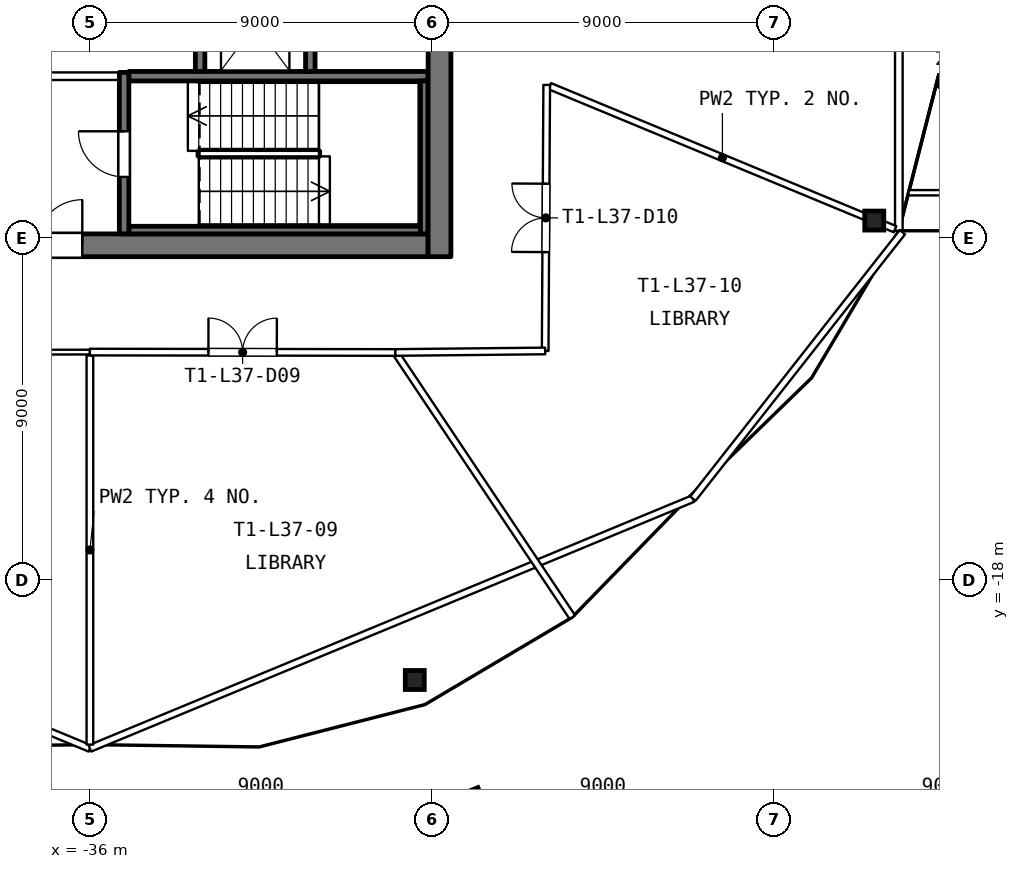
"""IFC4 building model, lengths in metres.
Left out: names, types, materials, properties, quantities, classifications, styles, units other than length and angle.
Written with IfcOpenShell. Run it as: python <this file> out.ifc"""

import sys

from ifc_helpers import new_model, si_unit, direction, frame, frame_2d, origin, origin_2d, place, context, subcontext, project, spatial, rectangle, hollow_rectangle, extrude, element, fill, save


model = new_model("IFC4")
c1 = context("Model", 3, precision=1e-05, world=origin(), true_north=direction((0.0, 1.0)))
c2 = subcontext(c1, "Body", "Model", "MODEL_VIEW")
j1 = project(units=[si_unit("LENGTHUNIT", "METRE"), si_unit("PLANEANGLEUNIT", "RADIAN")], contexts=[c1])
p1 = place(None, origin())
s1 = spatial("IfcSite", under=j1, at=p1, CompositionType="ELEMENT")
p2 = place(p1, origin())
s2 = spatial("IfcBuilding", under=s1, at=p2, CompositionType="ELEMENT")
p3 = place(p2, frame((0.0, 0.0, 130.8)))
s3 = spatial("IfcBuildingStorey", under=s2, at=p3, CompositionType="ELEMENT", Elevation=130.8)
p4 = place(p3, frame((-25.821, -24.575, 0.0), z_axis=(-0.007786476489, 0.018778670571, 0.999793344805), x_axis=(-0.707293788145, 0.706670185601, -0.018781534372)))
e1 = element("IfcColumn", 1, at=p4, inside=s3, PredefinedType="COLUMN", context=c2, shape_type="SweptSolid", body=[
    extrude(hollow_rectangle(XDim=0.9, YDim=0.9, WallThickness=0.08, at=origin_2d()), origin(), (0.0, 0.0, 1.0), 30.006),
])
p5 = place(p2, frame((0.0, 0.0, 156.8)))
s4 = spatial("IfcBuildingStorey", under=s2, at=p5, CompositionType="ELEMENT", Elevation=156.8)
for number, where, z_axis, x_axis in (
    (2, (-27.451, -20.639, 0.0), (0.0, 0.0, 1.0), (1.0, 0.0, 0.0)),
    (3, (-15.361, -8.549, 0.0), (0.0, 0.0, 1.0), (1.0, 0.0, 0.0)),
):
    element("IfcColumn", number, at=place(p5, frame(where, z_axis=z_axis, x_axis=x_axis)), inside=s4, PredefinedType="COLUMN", context=c2, shape_type="SweptSolid", body=[
        extrude(hollow_rectangle(XDim=0.5, YDim=0.5, WallThickness=0.03, at=origin_2d()), origin(), (0.0, 0.0, 1.0), 3.9),
    ])
p6 = place(p5, frame((-44.9, -9.2, 0.0), z_axis=(0.0, 0.0, 1.0), x_axis=(1.0, 0.0, 0.0)))
e4 = element("IfcWall", 4, at=p6, inside=s4, PredefinedType="SHEAR", context=c2, shape_type="SweptSolid", body=[
    extrude(rectangle(XDim=17.8, YDim=0.6, at=frame_2d((8.9, 0.0))), origin(), (0.0, 0.0, 1.0), 3.7),
])
p7 = place(p6, frame((7.5, 0.0, 0.0)))
e5 = element("IfcOpeningElement", 5, at=p7, cuts=e4, PredefinedType="OPENING", context=c2, shape_type="SweptSolid", body=[
    extrude(rectangle(XDim=1.2, YDim=2.1, at=frame_2d((0.6, 1.05))), frame((0.0, 0.31, 0.0), z_axis=(0.0, -1.0, 0.0), x_axis=(1.0, 0.0, 0.0)), (0.0, 0.0, 1.0), 0.62),
])
p8 = place(p6, frame((1.2, 0.0, 0.0)))
e6 = element("IfcOpeningElement", 6, at=p8, cuts=e4, PredefinedType="OPENING", context=c2, shape_type="SweptSolid", body=[
    extrude(rectangle(XDim=1.0, YDim=2.1, at=frame_2d((0.5, 1.05))), frame((0.0, 0.31, 0.0), z_axis=(0.0, -1.0, 0.0), x_axis=(1.0, 0.0, 0.0)), (0.0, 0.0, 1.0), 0.62),
])
p9 = place(p5, frame((-34.975, -8.8, 0.0), z_axis=(0.0, 0.0, 1.0), x_axis=(1.0, 0.0, 0.0)))
e7 = element("IfcWall", 7, at=p9, inside=s4, PredefinedType="SHEAR", context=c2, shape_type="SweptSolid", body=[
    extrude(rectangle(XDim=7.675, YDim=0.2, at=frame_2d((3.837, 0.0))), origin(), (0.0, 0.0, 1.0), 3.7),
])
p10 = place(p5, frame((-38.375, -4.75, 0.0), z_axis=(0.0, 0.0, 1.0), x_axis=(1.0, 0.0, 0.0)))
e8 = element("IfcWall", 8, at=p10, inside=s4, PredefinedType="PARTITIONING", context=c2, shape_type="SweptSolid", body=[
    extrude(rectangle(XDim=3.15, YDim=0.2, at=frame_2d((1.575, 0.0))), origin(), (0.0, 0.0, 1.0), 3.7),
])
p11 = place(p5, frame((-34.975, -4.75, 0.0), z_axis=(0.0, 0.0, 1.0), x_axis=(1.0, 0.0, 0.0)))
e9 = element("IfcWall", 9, at=p11, inside=s4, PredefinedType="SHEAR", context=c2, shape_type="SweptSolid", body=[
    extrude(rectangle(XDim=7.875, YDim=0.25, at=frame_2d((3.938, 0.0))), origin(), (0.0, 0.0, 1.0), 3.7),
])
p12 = place(p5, frame((-35.1, -8.9, 0.0), z_axis=(0.0, 0.0, 1.0), x_axis=(0.0, 1.0, 0.0)))
e10 = element("IfcWall", 10, at=p12, inside=s4, PredefinedType="SHEAR", context=c2, shape_type="SweptSolid", body=[
    extrude(rectangle(XDim=4.25, YDim=0.25, at=frame_2d((2.125, 0.0))), origin(), (0.0, 0.0, 1.0), 3.7),
])
p13 = place(p12, frame((1.5, 0.0, 0.0)))
e11 = element("IfcOpeningElement", 11, at=p13, cuts=e10, PredefinedType="OPENING", context=c2, shape_type="SweptSolid", body=[
    extrude(rectangle(XDim=1.2, YDim=2.1, at=frame_2d((0.6, 1.05))), frame((0.0, 0.135, 0.0), z_axis=(0.0, -1.0, 0.0), x_axis=(1.0, 0.0, 0.0)), (0.0, 0.0, 1.0), 0.27),
])
for number, where, z_axis, x_axis in (
    (12, (-33.1, -4.625, 0.0), (0.0, 0.0, 1.0), (0.0, 1.0, 0.0)),
    (13, (-30.2, -4.625, 0.0), (0.0, 0.0, 1.0), (0.0, 1.0, 0.0)),
):
    element("IfcWall", number, at=place(p5, frame(where, z_axis=z_axis, x_axis=x_axis)), inside=s4, PredefinedType="SHEAR", context=c2, shape_type="SweptSolid", body=[
        extrude(rectangle(XDim=2.675, YDim=0.25, at=frame_2d((1.337, 0.0))), origin(), (0.0, 0.0, 1.0), 3.7),
    ])
p14 = place(p5, frame((-27.2, -8.9, 0.0), z_axis=(0.0, 0.0, 1.0), x_axis=(0.0, 1.0, 0.0)))
e14 = element("IfcWall", 14, at=p14, inside=s4, PredefinedType="SHEAR", context=c2, shape_type="SweptSolid", body=[
    extrude(rectangle(XDim=4.025, YDim=0.2, at=frame_2d((2.012, 0.0))), origin(), (0.0, 0.0, 1.0), 3.7),
])
p15 = place(p5, frame((-26.8, -9.5, 0.0), z_axis=(0.0, 0.0, 1.0), x_axis=(0.0, 1.0, 0.0)))
e15 = element("IfcWall", 15, at=p15, inside=s4, PredefinedType="SHEAR", context=c2, shape_type="SweptSolid", body=[
    extrude(rectangle(XDim=19.0, YDim=0.6, at=frame_2d((9.5, 0.0))), origin(), (0.0, 0.0, 1.0), 3.7),
])
p16 = place(p15, frame((8.3, 0.0, 0.0)))
e16 = element("IfcOpeningElement", 16, at=p16, cuts=e15, PredefinedType="OPENING", context=c2, shape_type="SweptSolid", body=[
    extrude(rectangle(XDim=2.4, YDim=2.1, at=frame_2d((1.2, 1.05))), frame((0.0, 0.31, 0.0), z_axis=(0.0, -1.0, 0.0), x_axis=(1.0, 0.0, 0.0)), (0.0, 0.0, 1.0), 0.62),
])
p17 = place(p5, frame((-36.0, -22.339, 0.0), z_axis=(0.0, 0.0, 1.0), x_axis=(0.0, 1.0, 0.0)))
e17 = element("IfcWall", 17, at=p17, inside=s4, PredefinedType="PARTITIONING", context=c2, shape_type="SweptSolid", body=[
    extrude(rectangle(XDim=10.242, YDim=0.175, at=frame_2d((5.121, 0.0))), origin(), (0.0, 0.0, 1.0), 2.2),
])
p18 = place(p5, frame((-23.304, -18.986, 0.0), z_axis=(0.0, 0.0, 1.0), x_axis=(-0.555854795221, 0.831279403468, 0.0)))
e18 = element("IfcWall", 18, at=p18, inside=s4, PredefinedType="PARTITIONING", context=c2, shape_type="SweptSolid", body=[
    extrude(rectangle(XDim=8.292, YDim=0.175, at=frame_2d((4.146, 0.0))), origin(), (0.0, 0.0, 1.0), 2.2),
])
p19 = place(p5, frame((-14.814, -8.776, 0.0), z_axis=(0.0, 0.0, 1.0), x_axis=(-0.923885809309, 0.382668278482, 0.0)))
e19 = element("IfcWall", 19, at=p19, inside=s4, PredefinedType="PARTITIONING", context=c2, shape_type="SweptSolid", body=[
    extrude(rectangle(XDim=9.833, YDim=0.175, at=frame_2d((4.917, 0.0))), origin(), (0.0, 0.0, 1.0), 2.2),
])
p20 = place(p5, frame((-44.038, -12.021, 0.0), z_axis=(0.0, 0.0, 1.0), x_axis=(0.999999107004, 0.001336409935, 0.0)))
e20 = element("IfcWall", 20, at=p20, inside=s4, PredefinedType="PARTITIONING", context=c2, shape_type="SweptSolid", body=[
    extrude(rectangle(XDim=8.038, YDim=0.125, at=frame_2d((4.019, 0.0))), origin(), (0.0, 0.0, 1.0), 2.5),
])
p21 = place(p20, frame((3.119, 0.0, 0.0)))
e21 = element("IfcOpeningElement", 21, at=p21, cuts=e20, PredefinedType="OPENING", context=c2, shape_type="SweptSolid", body=[
    extrude(rectangle(XDim=1.8, YDim=2.1, at=frame_2d((0.9, 1.05))), frame((0.0, 0.073, 0.0), z_axis=(0.0, -1.0, 0.0), x_axis=(1.0, 0.0, 0.0)), (0.0, 0.0, 1.0), 0.145),
])
p22 = place(p5, frame((-36.0, -12.01, 0.0), z_axis=(0.0, 0.0, 1.0), x_axis=(0.999999107004, -0.001336409935, 0.0)))
e22 = element("IfcWall", 22, at=p22, inside=s4, PredefinedType="PARTITIONING", context=c2, shape_type="SweptSolid", body=[
    extrude(rectangle(XDim=8.038, YDim=0.175, at=frame_2d((4.019, 0.0))), origin(), (0.0, 0.0, 1.0), 2.5),
])
p23 = place(p22, frame((3.119, 0.0, 0.0)))
e23 = element("IfcOpeningElement", 23, at=p23, cuts=e22, PredefinedType="OPENING", context=c2, shape_type="SweptSolid", body=[
    extrude(rectangle(XDim=1.8, YDim=2.1, at=frame_2d((0.9, 1.05))), frame((0.0, 0.098, 0.0), z_axis=(0.0, -1.0, 0.0), x_axis=(1.0, 0.0, 0.0)), (0.0, 0.0, 1.0), 0.195),
])
p24 = place(p5, frame((-24.02, -11.98, 0.0), z_axis=(0.0, 0.0, 1.0), x_axis=(0.005788715954, 0.999983245243, 0.0)))
e24 = element("IfcWall", 24, at=p24, inside=s4, PredefinedType="PARTITIONING", context=c2, shape_type="SweptSolid", body=[
    extrude(rectangle(XDim=7.001, YDim=0.175, at=frame_2d((3.5, 0.0))), origin(), (0.0, 0.0, 1.0), 2.5),
])
p25 = place(p24, frame((2.601, 0.0, 0.0)))
e25 = element("IfcOpeningElement", 25, at=p25, cuts=e24, PredefinedType="OPENING", context=c2, shape_type="SweptSolid", body=[
    extrude(rectangle(XDim=1.8, YDim=2.1, at=frame_2d((0.9, 1.05))), frame((0.0, 0.098, 0.0), z_axis=(0.0, -1.0, 0.0), x_axis=(1.0, 0.0, 0.0)), (0.0, 0.0, 1.0), 0.195),
])
p26 = place(p5, frame((-27.962, -12.021, 0.0), z_axis=(0.0, 0.0, 1.0), x_axis=(0.999946514236, 0.010342565829, 0.0)))
e26 = element("IfcWall", 26, at=p26, inside=s4, PredefinedType="PARTITIONING", context=c2, shape_type="SweptSolid", body=[
    extrude(rectangle(XDim=3.942, YDim=0.175, at=frame_2d((1.971, 0.0))), origin(), (0.0, 0.0, 1.0), 3.7),
])
p27 = place(p5, frame((-14.714, -8.817, 0.0), z_axis=(0.0, 0.0, 1.0), x_axis=(0.0, 1.0, 0.0)))
e27 = element("IfcWall", 27, at=p27, inside=s4, PredefinedType="PARTITIONING", context=c2, shape_type="SweptSolid", body=[
    extrude(rectangle(XDim=17.634, YDim=0.2, at=frame_2d((8.817, 0.0))), origin(), (0.0, 0.0, 1.0), 3.7),
])
p28 = place(p27, frame((10.167, 0.0, 0.0)))
e28 = element("IfcOpeningElement", 28, at=p28, cuts=e27, PredefinedType="OPENING", context=c2, shape_type="SweptSolid", body=[
    extrude(rectangle(XDim=1.8, YDim=2.1, at=frame_2d((0.9, 1.05))), frame((0.0, 0.11, 0.0), z_axis=(0.0, -1.0, 0.0), x_axis=(1.0, 0.0, 0.0)), (0.0, 0.0, 1.0), 0.22),
])
p29 = place(p13, origin())
e29 = element("IfcDoor", 29, at=p29, inside=s4, OperationType="SINGLE_SWING_RIGHT", PredefinedType="DOOR", context=c2, shape_type="SweptSolid", body=[
    extrude(rectangle(XDim=1.2, YDim=2.1, at=frame_2d((0.6, 1.05))), frame((0.0, 0.025, 0.0), z_axis=(0.0, -1.0, 0.0), x_axis=(1.0, 0.0, 0.0)), (0.0, 0.0, 1.0), 0.05),
])
fill(e11, e29)
p30 = place(p7, origin())
e30 = element("IfcDoor", 30, at=p30, inside=s4, OperationType="SINGLE_SWING_RIGHT", PredefinedType="DOOR", context=c2, shape_type="SweptSolid", body=[
    extrude(rectangle(XDim=1.2, YDim=2.1, at=frame_2d((0.6, 1.05))), frame((0.0, 0.175, 0.0), z_axis=(0.0, -1.0, 0.0), x_axis=(1.0, 0.0, 0.0)), (0.0, 0.0, 1.0), 0.05),
])
fill(e5, e30)
p31 = place(p23, origin())
e31 = element("IfcDoor", 31, at=p31, inside=s4, OperationType="DOUBLE_DOOR_DOUBLE_SWING", PredefinedType="DOOR", context=c2, shape_type="SweptSolid", body=[
    extrude(rectangle(XDim=1.8, YDim=2.1, at=frame_2d((0.9, 1.05))), frame((0.0, 0.025, 0.0), z_axis=(0.0, -1.0, 0.0), x_axis=(1.0, 0.0, 0.0)), (0.0, 0.0, 1.0), 0.05),
])
fill(e23, e31)
p32 = place(p25, origin())
e32 = element("IfcDoor", 32, at=p32, inside=s4, OperationType="DOUBLE_DOOR_DOUBLE_SWING", PredefinedType="DOOR", context=c2, shape_type="SweptSolid", body=[
    extrude(rectangle(XDim=1.8, YDim=2.1, at=frame_2d((0.9, 1.05))), frame((0.0, 0.025, 0.0), z_axis=(0.0, -1.0, 0.0), x_axis=(1.0, 0.0, 0.0)), (0.0, 0.0, 1.0), 0.05),
])
fill(e25, e32)
save(model, sys.argv[1])
